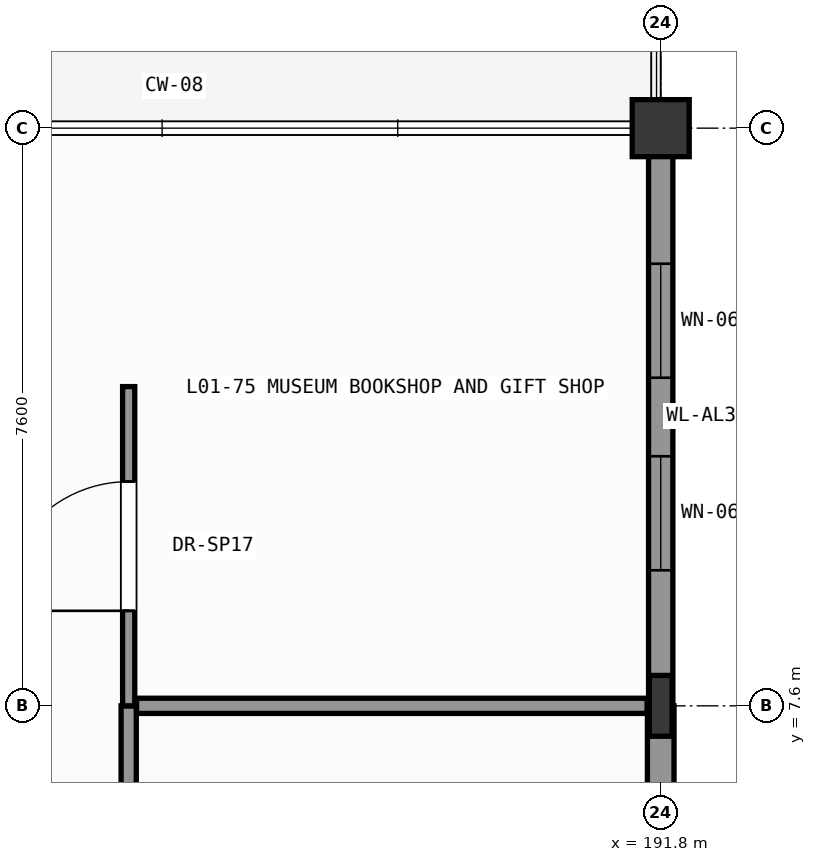
"""IFC4 building model, lengths in metres.
Left out: names, types, materials, properties, quantities, classifications, styles, units other than length and angle.
Written with IfcOpenShell. Run it as: python <this file> out.ifc"""

import sys

from ifc_helpers import new_model, si_unit, direction, frame, frame_2d, origin, origin_2d, place, context, subcontext, project, spatial, rectangle, circle, i_section, extrude, element, fill, save


model = new_model("IFC4")
c1 = context("Model", 3, precision=1e-05, world=origin(), true_north=direction((0.0, 1.0)))
c2 = subcontext(c1, "Body", "Model", "MODEL_VIEW")
j1 = project(units=[si_unit("LENGTHUNIT", "METRE"), si_unit("PLANEANGLEUNIT", "RADIAN")], contexts=[c1])
p1 = place(None, origin())
s1 = spatial("IfcSite", under=j1, at=p1, CompositionType="ELEMENT")
p2 = place(p1, origin())
s2 = spatial("IfcBuilding", under=s1, at=p2, CompositionType="ELEMENT")
p3 = place(p2, origin())
s3 = spatial("IfcBuildingStorey", under=s2, at=p3, CompositionType="ELEMENT", Elevation=0.0)
p4 = place(p3, frame((191.8, 7.6, 0.0), z_axis=(0.0, 0.0, 1.0), x_axis=(1.0, 0.0, 0.0)))
e1 = element("IfcColumn", 1, at=p4, inside=s3, PredefinedType="COLUMN", context=c2, shape_type="SweptSolid", body=[
    extrude(i_section(OverallWidth=0.3, OverallDepth=0.8, WebThickness=0.018, FlangeThickness=0.033, FilletRadius=0.03, at=origin_2d()), origin(), (0.0, 0.0, 1.0), 7.8),
])
p5 = place(p3, frame((191.8, 15.2, 0.0), z_axis=(0.0, 0.0, 1.0), x_axis=(1.0, 0.0, 0.0)))
e2 = element("IfcColumn", 2, at=p5, inside=s3, PredefinedType="COLUMN", context=c2, shape_type="SweptSolid", body=[
    extrude(circle(Radius=0.375, at=origin_2d()), origin(), (0.0, 0.0, 1.0), 7.8),
])
p6 = place(p3, frame((191.8, 7.6, 0.0), z_axis=(0.0, 0.0, 1.0), x_axis=(0.0, -1.0, 0.0)))
e3 = element("IfcWall", 3, at=p6, inside=s3, PredefinedType="SOLIDWALL", context=c2, shape_type="SweptSolid", body=[
    extrude(rectangle(XDim=4.518, YDim=0.35, at=frame_2d((2.259, 0.0))), origin(), (0.0, 0.0, 1.0), 7.145),
])
p7 = place(p6, frame((1.209, 0.0, 0.95)))
e4 = element("IfcOpeningElement", 4, at=p7, cuts=e3, PredefinedType="OPENING", context=c2, shape_type="SweptSolid", body=[
    extrude(rectangle(XDim=2.1, YDim=2.8, at=frame_2d((1.05, 1.4))), frame((0.0, 0.185, 0.0), z_axis=(0.0, -1.0, 0.0), x_axis=(1.0, 0.0, 0.0)), (0.0, 0.0, 1.0), 0.37),
])
p8 = place(p3, frame((191.8, 15.2, 0.0), z_axis=(0.0, 0.0, 1.0), x_axis=(0.0, -1.0, 0.0)))
e5 = element("IfcWall", 5, at=p8, inside=s3, PredefinedType="SOLIDWALL", context=c2, shape_type="SweptSolid", body=[
    extrude(rectangle(XDim=7.6, YDim=0.32, at=frame_2d((3.8, 0.0))), origin(), (0.0, 0.0, 1.0), 7.295),
])
p9 = place(p8, frame((1.783, 0.0, 0.95)))
e6 = element("IfcOpeningElement", 6, at=p9, cuts=e5, PredefinedType="OPENING", context=c2, shape_type="SweptSolid", body=[
    extrude(rectangle(XDim=1.5, YDim=2.4, at=frame_2d((0.75, 1.2))), frame((0.0, 0.17, 0.0), z_axis=(0.0, -1.0, 0.0), x_axis=(1.0, 0.0, 0.0)), (0.0, 0.0, 1.0), 0.34),
])
p10 = place(p8, frame((4.317, 0.0, 0.95)))
e7 = element("IfcOpeningElement", 7, at=p10, cuts=e5, PredefinedType="OPENING", context=c2, shape_type="SweptSolid", body=[
    extrude(rectangle(XDim=1.5, YDim=2.4, at=frame_2d((0.75, 1.2))), frame((0.0, 0.17, 0.0), z_axis=(0.0, -1.0, 0.0), x_axis=(1.0, 0.0, 0.0)), (0.0, 0.0, 1.0), 0.34),
])
p11 = place(p3, frame((191.636, 15.2, 0.0), z_axis=(0.0, 0.0, 1.0), x_axis=(-1.0, 0.0, 0.0)))
e8 = element("IfcWall", 8, at=p11, inside=s3, PredefinedType="SOLIDWALL", context=c2, shape_type="SweptSolid", body=[
    extrude(rectangle(XDim=0.196, YDim=0.35, at=frame_2d((0.098, 0.0))), origin(), (0.0, 0.0, 1.0), 7.54),
])
p12 = place(p3, frame((184.8, 0.164, 0.0), z_axis=(0.0, 0.0, 1.0), x_axis=(0.0, 1.0, 0.0)))
e9 = element("IfcWall", 9, at=p12, inside=s3, PredefinedType="PARTITIONING", context=c2, shape_type="SweptSolid", body=[
    extrude(rectangle(XDim=7.436, YDim=0.2, at=frame_2d((3.718, 0.0))), origin(), (0.0, 0.0, 1.0), 7.54),
])
p13 = place(p12, frame((3.143, 0.0, 0.0)))
e10 = element("IfcOpeningElement", 10, at=p13, cuts=e9, PredefinedType="OPENING", context=c2, shape_type="SweptSolid", body=[
    extrude(rectangle(XDim=1.15, YDim=2.15, at=frame_2d((0.575, 1.075))), frame((0.0, 0.11, 0.0), z_axis=(0.0, -1.0, 0.0), x_axis=(1.0, 0.0, 0.0)), (0.0, 0.0, 1.0), 0.22),
])
p14 = place(p3, frame((184.8, 7.6, 0.0), z_axis=(0.0, 0.0, 1.0), x_axis=(0.0, 1.0, 0.0)))
e11 = element("IfcWall", 11, at=p14, inside=s3, PredefinedType="PARTITIONING", context=c2, shape_type="SweptSolid", body=[
    extrude(rectangle(XDim=4.2, YDim=0.16, at=frame_2d((2.1, 0.0))), origin(), (0.0, 0.0, 1.0), 7.54),
])
p15 = place(p14, frame((1.25, 0.0, 0.0)))
e12 = element("IfcOpeningElement", 12, at=p15, cuts=e11, PredefinedType="OPENING", context=c2, shape_type="SweptSolid", body=[
    extrude(rectangle(XDim=1.7, YDim=2.45, at=frame_2d((0.85, 1.225))), frame((0.0, 0.09, 0.0), z_axis=(0.0, -1.0, 0.0), x_axis=(1.0, 0.0, 0.0)), (0.0, 0.0, 1.0), 0.18),
])
p16 = place(p3, frame((184.904, 7.6, 0.0), z_axis=(0.0, 0.0, 1.0), x_axis=(1.0, 0.0, 0.0)))
e13 = element("IfcWall", 13, at=p16, inside=s3, PredefinedType="PARTITIONING", context=c2, shape_type="SweptSolid", body=[
    extrude(rectangle(XDim=6.717, YDim=0.2, at=frame_2d((3.358, 0.0))), origin(), (0.0, 0.0, 1.0), 6.925),
])
p17 = place(p9, origin())
e14 = element("IfcWindow", 14, at=p17, inside=s3, PartitioningType="SINGLE_PANEL", PredefinedType="WINDOW", context=c2, shape_type="SweptSolid", body=[
    extrude(rectangle(XDim=1.5, YDim=2.4, at=frame_2d((0.75, 1.2))), frame((0.0, 0.03, 0.0), z_axis=(0.0, -1.0, 0.0), x_axis=(1.0, 0.0, 0.0)), (0.0, 0.0, 1.0), 0.06),
])
fill(e6, e14)
p18 = place(p10, origin())
e15 = element("IfcWindow", 15, at=p18, inside=s3, PartitioningType="SINGLE_PANEL", PredefinedType="WINDOW", context=c2, shape_type="SweptSolid", body=[
    extrude(rectangle(XDim=1.5, YDim=2.4, at=frame_2d((0.75, 1.2))), frame((0.0, 0.03, 0.0), z_axis=(0.0, -1.0, 0.0), x_axis=(1.0, 0.0, 0.0)), (0.0, 0.0, 1.0), 0.06),
])
fill(e7, e15)
p19 = place(p15, origin())
e16 = element("IfcDoor", 16, at=p19, inside=s3, OperationType="SINGLE_SWING_LEFT", PredefinedType="DOOR", context=c2, shape_type="SweptSolid", body=[
    extrude(rectangle(XDim=1.7, YDim=2.45, at=frame_2d((0.85, 1.225))), frame((0.0, 0.025, 0.0), z_axis=(0.0, -1.0, 0.0), x_axis=(1.0, 0.0, 0.0)), (0.0, 0.0, 1.0), 0.05),
])
fill(e12, e16)
save(model, sys.argv[1])
